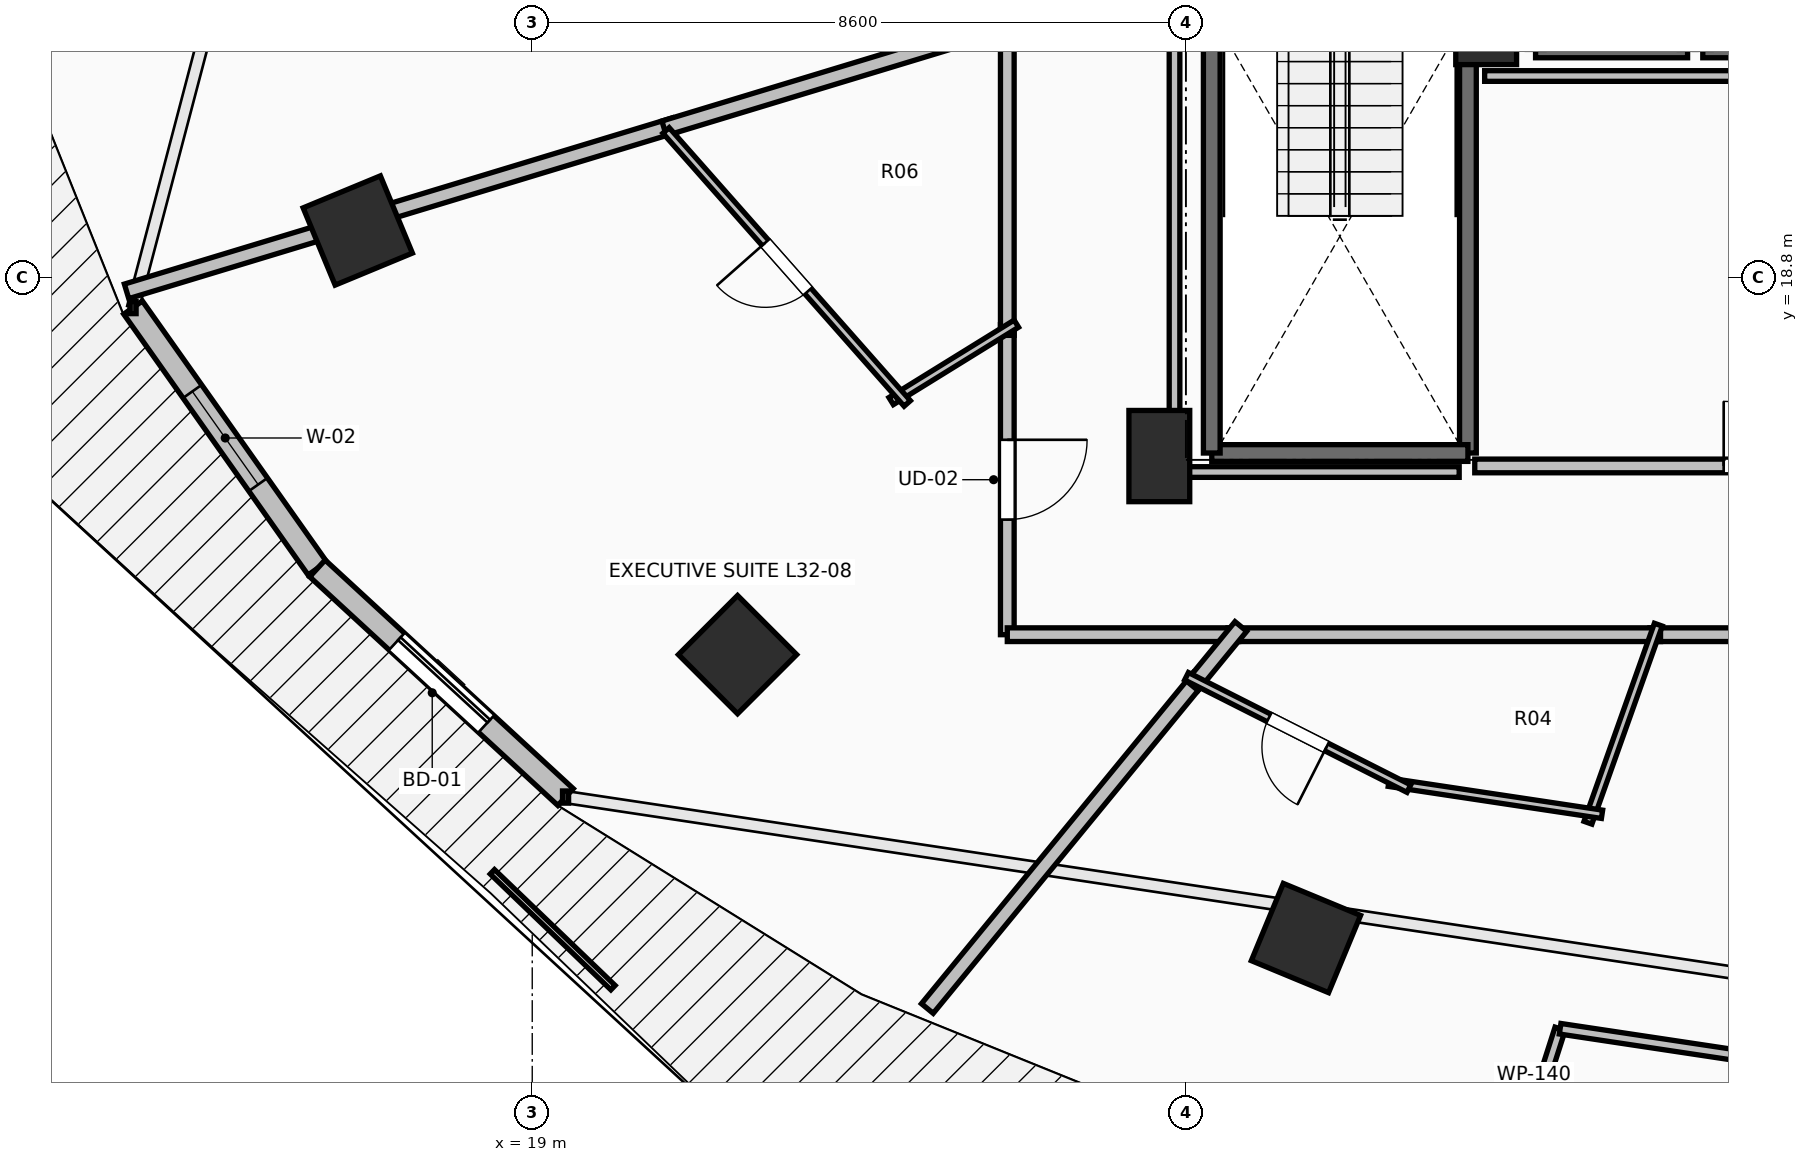
"""IFC4 building model, lengths in metres.
Left out: names, types, materials, properties, quantities, classifications, styles, units other than length and angle.
Written with IfcOpenShell. Run it as: python <this file> out.ifc"""

import sys

from ifc_helpers import new_model, si_unit, direction, frame, frame_2d, origin, origin_2d, place, context, subcontext, project, spatial, rectangle, extrude, element, fill, save


model = new_model("IFC4")
c1 = context("Model", 3, precision=1e-05, world=origin(), true_north=direction((0.0, 1.0)))
c2 = subcontext(c1, "Body", "Model", "MODEL_VIEW")
j1 = project(units=[si_unit("LENGTHUNIT", "METRE"), si_unit("PLANEANGLEUNIT", "RADIAN")], contexts=[c1])
p1 = place(None, origin())
s1 = spatial("IfcSite", under=j1, at=p1, CompositionType="ELEMENT")
p2 = place(p1, origin())
s2 = spatial("IfcBuilding", under=s1, at=p2, CompositionType="ELEMENT")
p3 = place(p2, frame((0.0, 0.0, 120.8)))
s3 = spatial("IfcBuildingStorey", under=s2, at=p3, CompositionType="ELEMENT", Elevation=120.8)
for number, where, z_axis, x_axis in (
    (1, (16.705, 19.418, 0.0), (0.0, 0.0, 1.0), (-0.924, -0.383, 0.0)),
    (2, (21.701, 13.838, 0.0), (0.0, 0.0, 1.0), (-0.707, -0.707, 0.0)),
    (3, (29.179, 10.109, 0.0), (0.0, 0.0, 1.0), (-0.383, -0.924, 0.0)),
):
    element("IfcColumn", number, at=place(p3, frame(where, z_axis=z_axis, x_axis=x_axis)), inside=s3, PredefinedType="COLUMN", context=c2, shape_type="SweptSolid", body=[
        extrude(rectangle(XDim=1.1, YDim=1.1, at=origin_2d()), origin(), (0.0, 0.0, 1.0), 3.5),
    ])
for number, where, z_axis, x_axis in (
    (4, (27.25, 16.45, 0.0), (0.0, 0.0, 1.0), (1.0, 0.0, 0.0)),
    (5, (31.55, 22.2, 0.0), (0.0, 0.0, 1.0), (1.0, 0.0, 0.0)),
):
    element("IfcColumn", number, at=place(p3, frame(where, z_axis=z_axis, x_axis=x_axis)), inside=s3, PredefinedType="PILASTER", context=c2, shape_type="SweptSolid", body=[
        extrude(rectangle(XDim=0.8, YDim=1.2, at=origin_2d()), origin(), (0.0, 0.0, 1.0), 3.5),
    ])
p4 = place(p3, frame((13.748, 18.404, 0.0), z_axis=(0.0, 0.0, 1.0), x_axis=(0.57716435238, -0.81662801222, 0.0)))
e6 = element("IfcWall", 6, at=p4, inside=s3, PredefinedType="STANDARD", context=c2, shape_type="SweptSolid", body=[
    extrude(rectangle(XDim=4.202, YDim=0.3, at=frame_2d((2.101, 0.0))), origin(), (0.0, 0.0, 1.0), 3.15),
])
p5 = place(p4, frame((1.351, 0.0, 0.85)))
e7 = element("IfcOpeningElement", 7, at=p5, cuts=e6, PredefinedType="OPENING", context=c2, shape_type="SweptSolid", body=[
    extrude(rectangle(XDim=1.5, YDim=2.1, at=frame_2d((0.75, 1.05))), frame((0.0, 0.165, 0.0), z_axis=(0.0, -1.0, 0.0), x_axis=(1.0, 0.0, 0.0)), (0.0, 0.0, 1.0), 0.33),
])
p6 = place(p3, frame((16.174, 14.972, 0.0), z_axis=(0.0, 0.0, 1.0), x_axis=(0.735416718093, -0.677615119924, 0.0)))
e8 = element("IfcWall", 8, at=p6, inside=s3, PredefinedType="STANDARD", context=c2, shape_type="SweptSolid", body=[
    extrude(rectangle(XDim=4.439, YDim=0.3, at=frame_2d((2.22, 0.0))), origin(), (0.0, 0.0, 1.0), 3.15),
])
p7 = place(p6, frame((1.419, 0.0, 0.0)))
e9 = element("IfcOpeningElement", 9, at=p7, cuts=e8, PredefinedType="OPENING", context=c2, shape_type="SweptSolid", body=[
    extrude(rectangle(XDim=1.6, YDim=2.3, at=frame_2d((0.8, 1.15))), frame((0.0, 0.165, 0.0), z_axis=(0.0, -1.0, 0.0), x_axis=(1.0, 0.0, 0.0)), (0.0, 0.0, 1.0), 0.33),
])
p8 = place(p3, frame((31.31, 23.91, 0.0), z_axis=(0.0, 0.0, 1.0), x_axis=(0.0, -1.0, 0.0)))
e10 = element("IfcWall", 10, at=p8, inside=s3, PredefinedType="SOLIDWALL", context=c2, shape_type="SweptSolid", body=[
    extrude(rectangle(XDim=7.42, YDim=0.22, at=frame_2d((3.71, 0.0))), origin(), (0.0, 0.0, 1.0), 3.15),
])
p9 = place(p3, frame((31.31, 16.49, 0.0), z_axis=(0.0, 0.0, 1.0), x_axis=(-1.0, 0.0, 0.0)))
e11 = element("IfcWall", 11, at=p9, inside=s3, PredefinedType="SOLIDWALL", context=c2, shape_type="SweptSolid", body=[
    extrude(rectangle(XDim=3.37, YDim=0.22, at=frame_2d((1.685, 0.0))), origin(), (0.0, 0.0, 1.0), 3.15),
])
p10 = place(p3, frame((27.94, 16.49, 0.0), z_axis=(0.0, 0.0, 1.0), x_axis=(0.0, 1.0, 0.0)))
e12 = element("IfcWall", 12, at=p10, inside=s3, PredefinedType="SOLIDWALL", context=c2, shape_type="SweptSolid", body=[
    extrude(rectangle(XDim=7.42, YDim=0.22, at=frame_2d((3.71, 0.0))), origin(), (0.0, 0.0, 1.0), 3.15),
])
for number, where, z_axis, x_axis in (
    (13, (32.2, 21.8, 0.0), (0.0, 0.0, 1.0), (1.0, 0.0, 0.0)),
    (14, (34.4, 21.8, 0.0), (0.0, 0.0, 1.0), (1.0, 0.0, 0.0)),
):
    element("IfcWall", number, at=place(p3, frame(where, z_axis=z_axis, x_axis=x_axis)), inside=s3, PredefinedType="SOLIDWALL", context=c2, shape_type="SweptSolid", body=[
        extrude(rectangle(XDim=2.0, YDim=0.22, at=frame_2d((1.0, 0.0))), origin(), (0.0, 0.0, 1.0), 3.15),
    ])
p11 = place(p3, frame((31.4, 16.32, 0.0), z_axis=(0.0, 0.0, 1.0), x_axis=(1.0, 0.0, 0.0)))
e15 = element("IfcWall", 15, at=p11, inside=s3, PredefinedType="PARTITIONING", context=c2, shape_type="SweptSolid", body=[
    extrude(rectangle(XDim=7.4, YDim=0.18, at=frame_2d((3.7, 0.0))), origin(), (0.0, 0.0, 1.0), 3.15),
])
p12 = place(p11, frame((3.275, 0.0, 0.0)))
e16 = element("IfcOpeningElement", 16, at=p12, cuts=e15, PredefinedType="OPENING", context=c2, shape_type="SweptSolid", body=[
    extrude(rectangle(XDim=0.85, YDim=2.1, at=frame_2d((0.425, 1.05))), frame((0.0, 0.105, 0.0), z_axis=(0.0, -1.0, 0.0), x_axis=(1.0, 0.0, 0.0)), (0.0, 0.0, 1.0), 0.21),
])
p13 = place(p3, frame((25.25, 18.178, 0.0), z_axis=(0.0, 0.0, 1.0), x_axis=(0.0, -1.0, 0.0)))
e17 = element("IfcWall", 17, at=p13, inside=s3, PredefinedType="PARTITIONING", context=c2, shape_type="SweptSolid", body=[
    extrude(rectangle(XDim=4.078, YDim=0.18, at=frame_2d((2.039, 0.0))), origin(), (0.0, 0.0, 1.0), 2.342),
])
p14 = place(p13, frame((1.514, 0.0, 0.0)))
e18 = element("IfcOpeningElement", 18, at=p14, cuts=e17, PredefinedType="OPENING", context=c2, shape_type="SweptSolid", body=[
    extrude(rectangle(XDim=1.05, YDim=2.2, at=frame_2d((0.525, 1.1))), frame((0.0, 0.105, 0.0), z_axis=(0.0, -1.0, 0.0), x_axis=(1.0, 0.0, 0.0)), (0.0, 0.0, 1.0), 0.21),
])
p15 = place(p3, frame((25.25, 14.1, 0.0), z_axis=(0.0, 0.0, 1.0), x_axis=(1.0, 0.0, 0.0)))
e19 = element("IfcWall", 19, at=p15, inside=s3, PredefinedType="PARTITIONING", context=c2, shape_type="SweptSolid", body=[
    extrude(rectangle(XDim=3.044, YDim=0.18, at=frame_2d((1.522, 0.0))), origin(), (0.0, 0.0, 1.0), 2.342),
])
p16 = place(p3, frame((25.25, 22.209, 0.0), z_axis=(0.0, 0.0, 1.0), x_axis=(0.0, -1.0, 0.0)))
e20 = element("IfcWall", 20, at=p16, inside=s3, PredefinedType="PARTITIONING", context=c2, shape_type="SweptSolid", body=[
    extrude(rectangle(XDim=4.171, YDim=0.18, at=frame_2d((2.085, 0.0))), origin(), (0.0, 0.0, 1.0), 3.15),
])
p17 = place(p3, frame((33.704, 14.1, 0.0), z_axis=(0.0, 0.0, 1.0), x_axis=(1.0, 0.0, 0.0)))
e21 = element("IfcWall", 21, at=p17, inside=s3, PredefinedType="PARTITIONING", context=c2, shape_type="SweptSolid", body=[
    extrude(rectangle(XDim=5.528, YDim=0.18, at=frame_2d((2.764, 0.0))), origin(), (0.0, 0.0, 1.0), 2.784),
])
p18 = place(p17, frame((2.239, 0.0, 0.0)))
e22 = element("IfcOpeningElement", 22, at=p18, cuts=e21, PredefinedType="OPENING", context=c2, shape_type="SweptSolid", body=[
    extrude(rectangle(XDim=1.05, YDim=2.2, at=frame_2d((0.525, 1.1))), frame((0.0, 0.105, 0.0), z_axis=(0.0, -1.0, 0.0), x_axis=(1.0, 0.0, 0.0)), (0.0, 0.0, 1.0), 0.21),
])
p19 = place(p3, frame((28.154, 14.1, 0.0), z_axis=(0.0, 0.0, 1.0), x_axis=(1.0, 0.0, 0.0)))
e23 = element("IfcWall", 23, at=p19, inside=s3, PredefinedType="PARTITIONING", context=c2, shape_type="SweptSolid", body=[
    extrude(rectangle(XDim=5.69, YDim=0.18, at=frame_2d((2.845, 0.0))), origin(), (0.0, 0.0, 1.0), 2.342),
])
p20 = place(p3, frame((13.663, 18.617, 0.0), z_axis=(0.0, 0.0, 1.0), x_axis=(0.956933827214, 0.290306132098, 0.0)))
e24 = element("IfcWall", 24, at=p20, inside=s3, PredefinedType="PARTITIONING", context=c2, shape_type="SweptSolid", body=[
    extrude(rectangle(XDim=7.53, YDim=0.2, at=frame_2d((3.765, 0.0))), origin(), (0.0, 0.0, 1.0), 2.839),
])
p21 = place(p3, frame((20.735, 20.762, 0.0), z_axis=(0.0, 0.0, 1.0), x_axis=(0.956916986017, 0.290361639807, 0.0)))
e25 = element("IfcWall", 25, at=p21, inside=s3, PredefinedType="PARTITIONING", context=c2, shape_type="SweptSolid", body=[
    extrude(rectangle(XDim=4.858, YDim=0.2, at=frame_2d((2.429, 0.0))), origin(), (0.0, 0.0, 1.0), 2.784),
])
p22 = place(p3, frame((25.369, 18.192, 0.0), z_axis=(0.0, 0.0, 1.0), x_axis=(-0.850587393094, -0.525833706328, 0.0)))
e26 = element("IfcWall", 26, at=p22, inside=s3, PredefinedType="PARTITIONING", context=c2, shape_type="SweptSolid", body=[
    extrude(rectangle(XDim=1.937, YDim=0.11, at=frame_2d((0.968, 0.0))), origin(), (0.0, 0.0, 1.0), 2.342),
])
p23 = place(p3, frame((23.934, 17.142, 0.0), z_axis=(0.0, 0.0, 1.0), x_axis=(-0.662103338525, 0.749412549344, 0.0)))
e27 = element("IfcWall", 27, at=p23, inside=s3, PredefinedType="PARTITIONING", context=c2, shape_type="SweptSolid", body=[
    extrude(rectangle(XDim=4.793, YDim=0.11, at=frame_2d((2.396, 0.0))), origin(), (0.0, 0.0, 1.0), 2.342),
])
p24 = place(p23, frame((1.971, 0.0, 0.0)))
e28 = element("IfcOpeningElement", 28, at=p24, cuts=e27, PredefinedType="OPENING", context=c2, shape_type="SweptSolid", body=[
    extrude(rectangle(XDim=0.85, YDim=2.1, at=frame_2d((0.425, 1.05))), frame((0.0, 0.07, 0.0), z_axis=(0.0, -1.0, 0.0), x_axis=(1.0, 0.0, 0.0)), (0.0, 0.0, 1.0), 0.14),
])
p25 = place(p3, frame((24.198, 9.182, 0.0), z_axis=(0.0, 0.0, 1.0), x_axis=(0.634365086516, 0.773033593713, 0.0)))
e29 = element("IfcWall", 29, at=p25, inside=s3, PredefinedType="PARTITIONING", context=c2, shape_type="SweptSolid", body=[
    extrude(rectangle(XDim=5.634, YDim=0.2, at=frame_2d((2.817, 0.0))), origin(), (0.0, 0.0, 1.0), 2.587),
])
p26 = place(p3, frame((27.683, 13.429, 0.0), z_axis=(0.0, 0.0, 1.0), x_axis=(0.634186727441, 0.77317992391, 0.0)))
e30 = element("IfcWall", 30, at=p26, inside=s3, PredefinedType="PARTITIONING", context=c2, shape_type="SweptSolid", body=[
    extrude(rectangle(XDim=1.008, YDim=0.2, at=frame_2d((0.504, 0.0))), origin(), (0.0, 0.0, 1.0), 2.342),
])
p27 = place(p3, frame((33.815, 14.232, 0.0), z_axis=(0.0, 0.0, 1.0), x_axis=(-0.334786713612, -0.942293933117, 0.0)))
e31 = element("IfcWall", 31, at=p27, inside=s3, PredefinedType="PARTITIONING", context=c2, shape_type="SweptSolid", body=[
    extrude(rectangle(XDim=2.765, YDim=0.11, at=frame_2d((1.383, 0.0))), origin(), (0.0, 0.0, 1.0), 2.784),
])
p28 = place(p3, frame((33.074, 11.737, 0.0), z_axis=(0.0, 0.0, 1.0), x_axis=(-0.988902866222, 0.148563525729, 0.0)))
e32 = element("IfcWall", 32, at=p28, inside=s3, PredefinedType="PARTITIONING", context=c2, shape_type="SweptSolid", body=[
    extrude(rectangle(XDim=2.836, YDim=0.11, at=frame_2d((1.418, 0.0))), origin(), (0.0, 0.0, 1.0), 3.15),
])
p29 = place(p3, frame((30.533, 12.075, 0.0), z_axis=(0.0, 0.0, 1.0), x_axis=(-0.892451870397, 0.451142614952, 0.0)))
e33 = element("IfcWall", 33, at=p29, inside=s3, PredefinedType="PARTITIONING", context=c2, shape_type="SweptSolid", body=[
    extrude(rectangle(XDim=3.277, YDim=0.11, at=frame_2d((1.639, 0.0))), origin(), (0.0, 0.0, 1.0), 2.342),
])
p30 = place(p29, frame((1.214, 0.0, 0.0)))
e34 = element("IfcOpeningElement", 34, at=p30, cuts=e33, PredefinedType="OPENING", context=c2, shape_type="SweptSolid", body=[
    extrude(rectangle(XDim=0.85, YDim=2.1, at=frame_2d((0.425, 1.05))), frame((0.0, 0.07, 0.0), z_axis=(0.0, -1.0, 0.0), x_axis=(1.0, 0.0, 0.0)), (0.0, 0.0, 1.0), 0.14),
])
p31 = place(p3, frame((31.836, 6.771, 0.0), z_axis=(0.0, 0.0, 1.0), x_axis=(0.305019563363, 0.952346085184, 0.0)))
e35 = element("IfcWall", 35, at=p31, inside=s3, PredefinedType="PARTITIONING", context=c2, shape_type="SweptSolid", body=[
    extrude(rectangle(XDim=2.252, YDim=0.14, at=frame_2d((1.126, 0.0))), origin(), (0.0, 0.0, 1.0), 3.15),
])
p32 = place(p3, frame((32.523, 8.916, 0.0), z_axis=(0.0, 0.0, 1.0), x_axis=(0.988872243588, -0.148767220385, 0.0)))
e36 = element("IfcWall", 36, at=p32, inside=s3, PredefinedType="PARTITIONING", context=c2, shape_type="SweptSolid", body=[
    extrude(rectangle(XDim=5.539, YDim=0.14, at=frame_2d((2.769, 0.0))), origin(), (0.0, 0.0, 1.0), 3.15),
])
p33 = place(p32, frame((2.319, 0.0, 0.0)))
e37 = element("IfcOpeningElement", 37, at=p33, cuts=e36, PredefinedType="OPENING", context=c2, shape_type="SweptSolid", body=[
    extrude(rectangle(XDim=0.9, YDim=2.1, at=frame_2d((0.45, 1.05))), frame((0.0, 0.085, 0.0), z_axis=(0.0, -1.0, 0.0), x_axis=(1.0, 0.0, 0.0)), (0.0, 0.0, 1.0), 0.17),
])
p34 = place(p3, frame((36.439, 21.45, 0.0), z_axis=(0.0, 0.0, 1.0), x_axis=(-1.0, 0.0, 0.0)))
e38 = element("IfcWall", 38, at=p34, inside=s3, PredefinedType="PARTITIONING", context=c2, shape_type="SweptSolid", body=[
    extrude(rectangle(XDim=4.909, YDim=0.14, at=frame_2d((2.455, 0.0))), origin(), (0.0, 0.0, 1.0), 3.15),
])
p35 = place(p3, frame((31.195, 16.24, 0.0), z_axis=(0.0, 0.0, 1.0), x_axis=(-1.0, 0.0, 0.0)))
e39 = element("IfcWall", 39, at=p35, inside=s3, PredefinedType="PARTITIONING", context=c2, shape_type="SweptSolid", body=[
    extrude(rectangle(XDim=3.745, YDim=0.14, at=frame_2d((1.873, 0.0))), origin(), (0.0, 0.0, 1.0), 2.342),
])
p36 = place(p3, frame((27.45, 16.24, 0.0), z_axis=(0.0, 0.0, 1.0), x_axis=(0.0, 1.0, 0.0)))
e40 = element("IfcWall", 40, at=p36, inside=s3, PredefinedType="PARTITIONING", context=c2, shape_type="SweptSolid", body=[
    extrude(rectangle(XDim=7.514, YDim=0.14, at=frame_2d((3.757, 0.0))), origin(), (0.0, 0.0, 1.0), 2.342),
])
p37 = place(p7, origin())
e41 = element("IfcDoor", 41, at=p37, inside=s3, OperationType="SLIDING_TO_LEFT", PredefinedType="DOOR", context=c2, shape_type="SweptSolid", body=[
    extrude(rectangle(XDim=1.6, YDim=2.3, at=frame_2d((0.8, 1.15))), frame((0.0, 0.025, 0.0), z_axis=(0.0, -1.0, 0.0), x_axis=(1.0, 0.0, 0.0)), (0.0, 0.0, 1.0), 0.05),
])
fill(e9, e41)
p38 = place(p5, origin())
e42 = element("IfcWindow", 42, at=p38, inside=s3, PartitioningType="SINGLE_PANEL", PredefinedType="WINDOW", context=c2, shape_type="SweptSolid", body=[
    extrude(rectangle(XDim=1.5, YDim=2.1, at=frame_2d((0.75, 1.05))), frame((0.0, 0.03, 0.0), z_axis=(0.0, -1.0, 0.0), x_axis=(1.0, 0.0, 0.0)), (0.0, 0.0, 1.0), 0.06),
])
fill(e7, e42)
p39 = place(p12, origin())
e43 = element("IfcDoor", 43, at=p39, inside=s3, OperationType="SINGLE_SWING_LEFT", PredefinedType="DOOR", context=c2, shape_type="SweptSolid", body=[
    extrude(rectangle(XDim=0.85, YDim=2.1, at=frame_2d((0.425, 1.05))), frame((0.0, 0.025, 0.0), z_axis=(0.0, -1.0, 0.0), x_axis=(1.0, 0.0, 0.0)), (0.0, 0.0, 1.0), 0.05),
])
fill(e16, e43)
p40 = place(p14, origin())
e44 = element("IfcDoor", 44, at=p40, inside=s3, OperationType="SINGLE_SWING_LEFT", PredefinedType="DOOR", context=c2, shape_type="SweptSolid", body=[
    extrude(rectangle(XDim=1.05, YDim=2.2, at=frame_2d((0.525, 1.1))), frame((0.0, 0.025, 0.0), z_axis=(0.0, -1.0, 0.0), x_axis=(1.0, 0.0, 0.0)), (0.0, 0.0, 1.0), 0.05),
])
fill(e18, e44)
p41 = place(p24, origin())
e45 = element("IfcDoor", 45, at=p41, inside=s3, OperationType="SINGLE_SWING_RIGHT", PredefinedType="DOOR", context=c2, shape_type="SweptSolid", body=[
    extrude(rectangle(XDim=0.85, YDim=2.1, at=frame_2d((0.425, 1.05))), frame((0.0, 0.025, 0.0), z_axis=(0.0, -1.0, 0.0), x_axis=(1.0, 0.0, 0.0)), (0.0, 0.0, 1.0), 0.05),
])
fill(e28, e45)
p42 = place(p30, origin())
e46 = element("IfcDoor", 46, at=p42, inside=s3, OperationType="SINGLE_SWING_LEFT", PredefinedType="DOOR", context=c2, shape_type="SweptSolid", body=[
    extrude(rectangle(XDim=0.85, YDim=2.1, at=frame_2d((0.425, 1.05))), frame((0.0, 0.025, 0.0), z_axis=(0.0, -1.0, 0.0), x_axis=(1.0, 0.0, 0.0)), (0.0, 0.0, 1.0), 0.05),
])
fill(e34, e46)
save(model, sys.argv[1])
